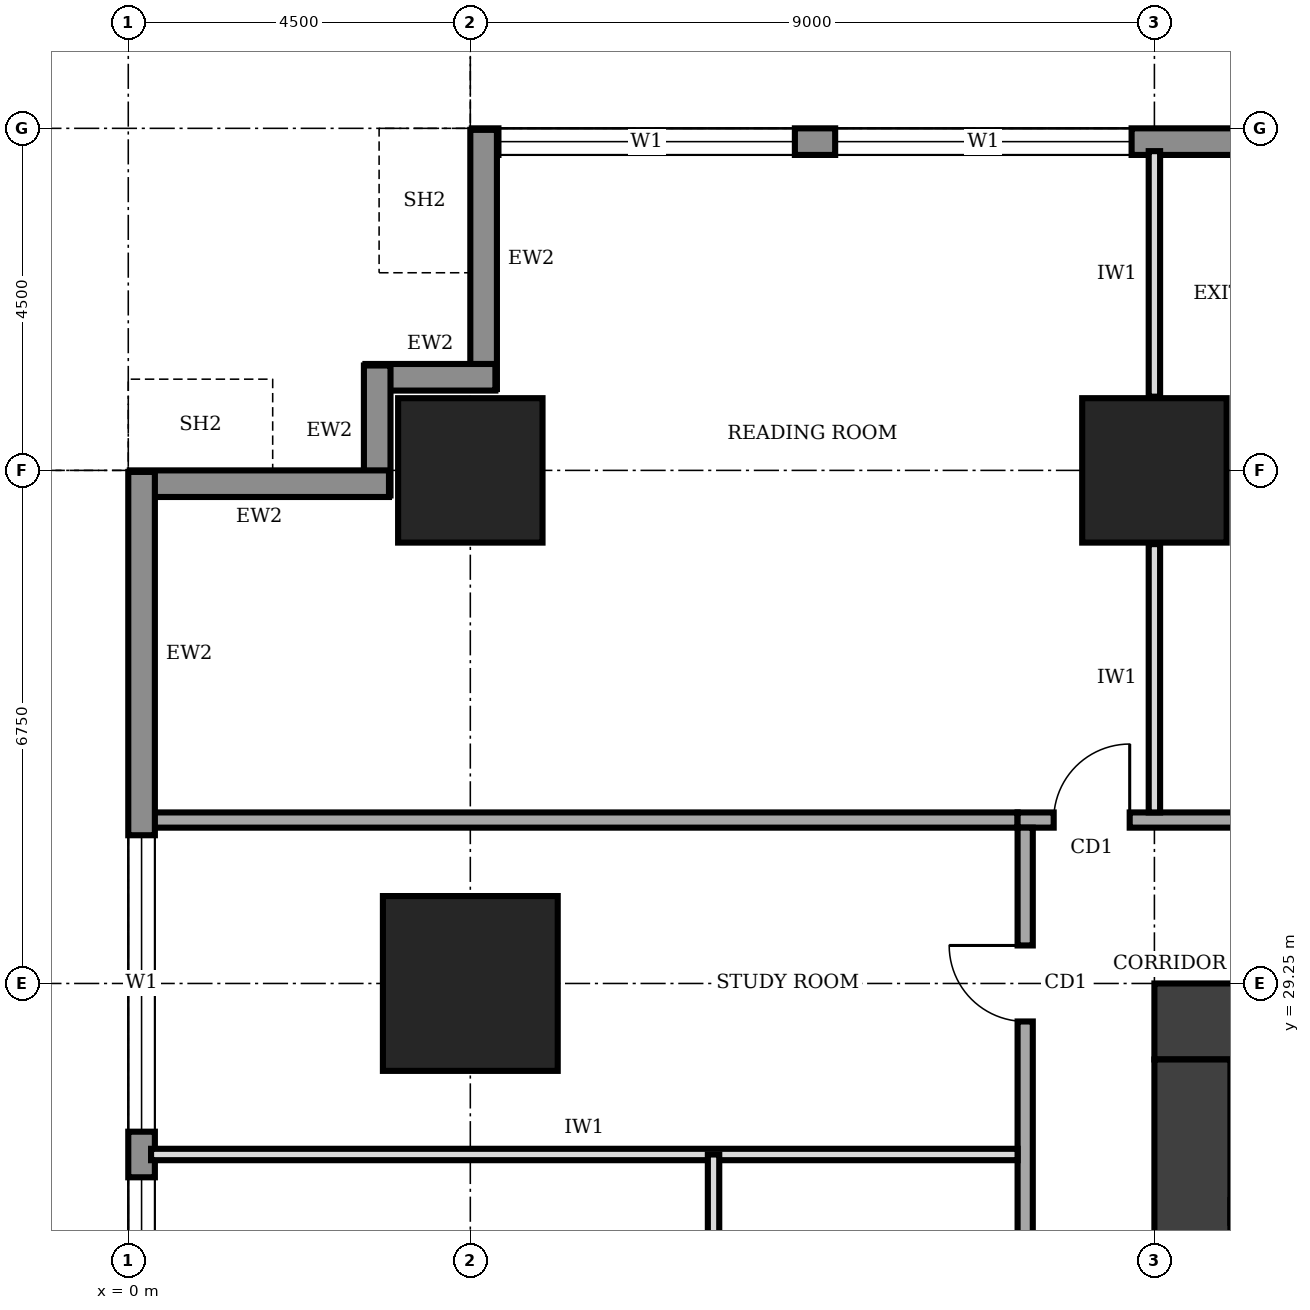
"""IFC4 building model, lengths in metres.
Left out: names, types, materials, properties, quantities, classifications, styles, units other than length and angle.
Written with IfcOpenShell. Run it as: python <this file> out.ifc"""

import sys

from ifc_helpers import new_model, si_unit, direction, frame, frame_2d, origin, origin_2d, place, context, subcontext, project, spatial, rectangle, extrude, element, fill, save


model = new_model("IFC4")
c1 = context("Model", 3, precision=1e-05, world=origin(), true_north=direction((0.0, 1.0)))
c2 = subcontext(c1, "Body", "Model", "MODEL_VIEW")
j1 = project(units=[si_unit("LENGTHUNIT", "METRE"), si_unit("PLANEANGLEUNIT", "RADIAN")], contexts=[c1])
p1 = place(None, origin())
s1 = spatial("IfcSite", under=j1, at=p1, CompositionType="ELEMENT")
p2 = place(p1, origin())
s2 = spatial("IfcBuilding", under=s1, at=p2, CompositionType="ELEMENT")
p3 = place(p2, frame((0.0, 0.0, 129.0)))
s3 = spatial("IfcBuildingStorey", under=s2, at=p3, CompositionType="ELEMENT", Elevation=129.0)
p4 = place(p3, frame((27.0, 28.75, 0.0), z_axis=(0.0, 0.0, 1.0), x_axis=(-1.0, 0.0, 0.0)))
e1 = element("IfcWall", 1, at=p4, inside=s3, PredefinedType="SHEAR", context=c2, shape_type="SweptSolid", body=[
    extrude(rectangle(XDim=13.5, YDim=1.0, at=frame_2d((6.75, 0.0))), origin(), (0.0, 0.0, 1.0), 4.0),
])
p5 = place(p4, frame((4.75, 0.0, 0.0)))
e2 = element("IfcOpeningElement", 2, at=p5, cuts=e1, PredefinedType="OPENING", context=c2, shape_type="SweptSolid", body=[
    extrude(rectangle(XDim=1.8, YDim=2.1, at=frame_2d((0.9, 1.05))), frame((0.0, 0.51, 0.0), z_axis=(0.0, -1.0, 0.0), x_axis=(1.0, 0.0, 0.0)), (0.0, 0.0, 1.0), 1.02),
])
p6 = place(p3, frame((14.0, 28.25, 0.0), z_axis=(0.0, 0.0, 1.0), x_axis=(0.0, -1.0, 0.0)))
e3 = element("IfcWall", 3, at=p6, inside=s3, PredefinedType="SHEAR", context=c2, shape_type="SweptSolid", body=[
    extrude(rectangle(XDim=16.0, YDim=1.0, at=frame_2d((8.0, 0.0))), origin(), (0.0, 0.0, 1.0), 4.0),
])
p7 = place(p3, frame((4.5, 29.25, 0.0), z_axis=(0.0, 0.0, 1.0), x_axis=(1.0, 0.0, 0.0)))
e4 = element("IfcColumn", 4, at=p7, inside=s3, PredefinedType="COLUMN", context=c2, shape_type="SweptSolid", body=[
    extrude(rectangle(XDim=2.3, YDim=2.3, at=origin_2d()), origin(), (0.0, 0.0, 1.0), 4.0),
])
for number, where, z_axis, x_axis in (
    (5, (4.5, 36.0, 0.0), (0.0, 0.0, 1.0), (1.0, 0.0, 0.0)),
    (6, (13.5, 36.0, 0.0), (0.0, 0.0, 1.0), (1.0, 0.0, 0.0)),
):
    element("IfcColumn", number, at=place(p3, frame(where, z_axis=z_axis, x_axis=x_axis)), inside=s3, PredefinedType="COLUMN", context=c2, shape_type="SweptSolid", body=[
        extrude(rectangle(XDim=1.9, YDim=1.9, at=origin_2d()), origin(), (0.0, 0.0, 1.0), 4.0),
    ])
p8 = place(p3, frame((35.98, 40.325, 0.0), z_axis=(0.0, 0.0, 1.0), x_axis=(-1.0, 0.0, 0.0)))
e7 = element("IfcWall", 7, at=p8, inside=s3, PredefinedType="STANDARD", context=c2, shape_type="SweptSolid", body=[
    extrude(rectangle(XDim=31.46, YDim=0.35, at=frame_2d((15.73, 0.0))), origin(), (0.0, 0.0, 1.0), 3.75),
])
p9 = place(p8, frame((27.21, 0.0, 0.9)))
e8 = element("IfcOpeningElement", 8, at=p9, cuts=e7, PredefinedType="OPENING", context=c2, shape_type="SweptSolid", body=[
    extrude(rectangle(XDim=3.9, YDim=2.2, at=frame_2d((1.95, 1.1))), frame((0.0, 0.185, 0.0), z_axis=(0.0, -1.0, 0.0), x_axis=(1.0, 0.0, 0.0)), (0.0, 0.0, 1.0), 0.37),
])
p10 = place(p8, frame((22.78, 0.0, 0.9)))
e9 = element("IfcOpeningElement", 9, at=p10, cuts=e7, PredefinedType="OPENING", context=c2, shape_type="SweptSolid", body=[
    extrude(rectangle(XDim=3.9, YDim=2.2, at=frame_2d((1.95, 1.1))), frame((0.0, 0.185, 0.0), z_axis=(0.0, -1.0, 0.0), x_axis=(1.0, 0.0, 0.0)), (0.0, 0.0, 1.0), 0.37),
])
p11 = place(p8, frame((4.78, 0.0, 0.9)))
e10 = element("IfcOpeningElement", 10, at=p11, cuts=e7, PredefinedType="OPENING", context=c2, shape_type="SweptSolid", body=[
    extrude(rectangle(XDim=3.9, YDim=2.2, at=frame_2d((1.95, 1.1))), frame((0.0, 0.185, 0.0), z_axis=(0.0, -1.0, 0.0), x_axis=(1.0, 0.0, 0.0)), (0.0, 0.0, 1.0), 0.37),
])
p12 = place(p3, frame((4.675, 40.48, 0.0), z_axis=(0.0, 0.0, 1.0), x_axis=(0.0, -1.0, 0.0)))
e11 = element("IfcWall", 11, at=p12, inside=s3, PredefinedType="STANDARD", context=c2, shape_type="SweptSolid", body=[
    extrude(rectangle(XDim=3.41, YDim=0.35, at=frame_2d((1.705, 0.0))), origin(), (0.0, 0.0, 1.0), 2.85),
])
for number, where, z_axis, x_axis in (
    (12, (4.83, 37.225, 0.0), (0.0, 0.0, 1.0), (-1.0, 0.0, 0.0)),
    (13, (3.275, 37.38, 0.0), (0.0, 0.0, 1.0), (0.0, -1.0, 0.0)),
):
    element("IfcWall", number, at=place(p3, frame(where, z_axis=z_axis, x_axis=x_axis)), inside=s3, PredefinedType="STANDARD", context=c2, shape_type="SweptSolid", body=[
        extrude(rectangle(XDim=1.71, YDim=0.35, at=frame_2d((0.855, 0.0))), origin(), (0.0, 0.0, 1.0), 3.75),
    ])
p13 = place(p3, frame((3.43, 35.825, 0.0), z_axis=(0.0, 0.0, 1.0), x_axis=(-1.0, 0.0, 0.0)))
e14 = element("IfcWall", 14, at=p13, inside=s3, PredefinedType="STANDARD", context=c2, shape_type="SweptSolid", body=[
    extrude(rectangle(XDim=3.41, YDim=0.35, at=frame_2d((1.705, 0.0))), origin(), (0.0, 0.0, 1.0), 2.85),
])
p14 = place(p3, frame((0.175, 35.98, 0.0), z_axis=(0.0, 0.0, 1.0), x_axis=(0.0, -1.0, 0.0)))
e15 = element("IfcWall", 15, at=p14, inside=s3, PredefinedType="STANDARD", context=c2, shape_type="SweptSolid", body=[
    extrude(rectangle(XDim=31.46, YDim=0.35, at=frame_2d((15.73, 0.0))), origin(), (0.0, 0.0, 1.0), 3.75),
])
p15 = place(p14, frame((27.21, 0.0, 0.9)))
e16 = element("IfcOpeningElement", 16, at=p15, cuts=e15, PredefinedType="OPENING", context=c2, shape_type="SweptSolid", body=[
    extrude(rectangle(XDim=3.9, YDim=2.2, at=frame_2d((1.95, 1.1))), frame((0.0, 0.185, 0.0), z_axis=(0.0, -1.0, 0.0), x_axis=(1.0, 0.0, 0.0)), (0.0, 0.0, 1.0), 0.37),
])
p16 = place(p14, frame((22.78, 0.0, 0.9)))
e17 = element("IfcOpeningElement", 17, at=p16, cuts=e15, PredefinedType="OPENING", context=c2, shape_type="SweptSolid", body=[
    extrude(rectangle(XDim=3.9, YDim=2.2, at=frame_2d((1.95, 1.1))), frame((0.0, 0.185, 0.0), z_axis=(0.0, -1.0, 0.0), x_axis=(1.0, 0.0, 0.0)), (0.0, 0.0, 1.0), 0.37),
])
p17 = place(p14, frame((18.28, 0.0, 0.9)))
e18 = element("IfcOpeningElement", 18, at=p17, cuts=e15, PredefinedType="OPENING", context=c2, shape_type="SweptSolid", body=[
    extrude(rectangle(XDim=3.9, YDim=2.2, at=frame_2d((1.95, 1.1))), frame((0.0, 0.185, 0.0), z_axis=(0.0, -1.0, 0.0), x_axis=(1.0, 0.0, 0.0)), (0.0, 0.0, 1.0), 0.37),
])
p18 = place(p14, frame((13.78, 0.0, 0.9)))
e19 = element("IfcOpeningElement", 19, at=p18, cuts=e15, PredefinedType="OPENING", context=c2, shape_type="SweptSolid", body=[
    extrude(rectangle(XDim=3.9, YDim=2.2, at=frame_2d((1.95, 1.1))), frame((0.0, 0.185, 0.0), z_axis=(0.0, -1.0, 0.0), x_axis=(1.0, 0.0, 0.0)), (0.0, 0.0, 1.0), 0.37),
])
p19 = place(p14, frame((9.28, 0.0, 0.9)))
e20 = element("IfcOpeningElement", 20, at=p19, cuts=e15, PredefinedType="OPENING", context=c2, shape_type="SweptSolid", body=[
    extrude(rectangle(XDim=3.9, YDim=2.2, at=frame_2d((1.95, 1.1))), frame((0.0, 0.185, 0.0), z_axis=(0.0, -1.0, 0.0), x_axis=(1.0, 0.0, 0.0)), (0.0, 0.0, 1.0), 0.37),
])
p20 = place(p14, frame((4.78, 0.0, 0.9)))
e21 = element("IfcOpeningElement", 21, at=p20, cuts=e15, PredefinedType="OPENING", context=c2, shape_type="SweptSolid", body=[
    extrude(rectangle(XDim=3.9, YDim=2.2, at=frame_2d((1.95, 1.1))), frame((0.0, 0.185, 0.0), z_axis=(0.0, -1.0, 0.0), x_axis=(1.0, 0.0, 0.0)), (0.0, 0.0, 1.0), 0.37),
])
p21 = place(p3, frame((28.6, 31.4, 0.0), z_axis=(0.0, 0.0, 1.0), x_axis=(-1.0, 0.0, 0.0)))
e22 = element("IfcWall", 22, at=p21, inside=s3, PredefinedType="SOLIDWALL", context=c2, shape_type="SweptSolid", body=[
    extrude(rectangle(XDim=16.9, YDim=0.2, at=frame_2d((8.45, 0.0))), origin(), (0.0, 0.0, 1.0), 3.75),
])
p22 = place(p21, frame((15.425, 0.0, 0.0)))
e23 = element("IfcOpeningElement", 23, at=p22, cuts=e22, PredefinedType="OPENING", context=c2, shape_type="SweptSolid", body=[
    extrude(rectangle(XDim=1.0, YDim=2.1, at=frame_2d((0.5, 1.05))), frame((0.0, 0.11, 0.0), z_axis=(0.0, -1.0, 0.0), x_axis=(1.0, 0.0, 0.0)), (0.0, 0.0, 1.0), 0.22),
])
p23 = place(p21, frame((12.35, 0.0, 0.0)))
e24 = element("IfcOpeningElement", 24, at=p23, cuts=e22, PredefinedType="OPENING", context=c2, shape_type="SweptSolid", body=[
    extrude(rectangle(XDim=1.0, YDim=2.1, at=frame_2d((0.5, 1.05))), frame((0.0, 0.11, 0.0), z_axis=(0.0, -1.0, 0.0), x_axis=(1.0, 0.0, 0.0)), (0.0, 0.0, 1.0), 0.22),
])
p24 = place(p21, frame((5.6, 0.0, 0.0)))
e25 = element("IfcOpeningElement", 25, at=p24, cuts=e22, PredefinedType="OPENING", context=c2, shape_type="SweptSolid", body=[
    extrude(rectangle(XDim=1.0, YDim=2.1, at=frame_2d((0.5, 1.05))), frame((0.0, 0.11, 0.0), z_axis=(0.0, -1.0, 0.0), x_axis=(1.0, 0.0, 0.0)), (0.0, 0.0, 1.0), 0.22),
])
p25 = place(p21, frame((0.275, 0.0, 0.0)))
e26 = element("IfcOpeningElement", 26, at=p25, cuts=e22, PredefinedType="OPENING", context=c2, shape_type="SweptSolid", body=[
    extrude(rectangle(XDim=1.0, YDim=2.1, at=frame_2d((0.5, 1.05))), frame((0.0, 0.11, 0.0), z_axis=(0.0, -1.0, 0.0), x_axis=(1.0, 0.0, 0.0)), (0.0, 0.0, 1.0), 0.22),
])
p26 = place(p3, frame((11.8, 31.3, 0.0), z_axis=(0.0, 0.0, 1.0), x_axis=(0.0, -1.0, 0.0)))
e27 = element("IfcWall", 27, at=p26, inside=s3, PredefinedType="SOLIDWALL", context=c2, shape_type="SweptSolid", body=[
    extrude(rectangle(XDim=23.8, YDim=0.2, at=frame_2d((11.9, 0.0))), origin(), (0.0, 0.0, 1.0), 3.75),
])
p27 = place(p26, frame((20.3, 0.0, 0.0)))
e28 = element("IfcOpeningElement", 28, at=p27, cuts=e27, PredefinedType="OPENING", context=c2, shape_type="SweptSolid", body=[
    extrude(rectangle(XDim=1.0, YDim=2.1, at=frame_2d((0.5, 1.05))), frame((0.0, 0.11, 0.0), z_axis=(0.0, -1.0, 0.0), x_axis=(1.0, 0.0, 0.0)), (0.0, 0.0, 1.0), 0.22),
])
p28 = place(p26, frame((16.2, 0.0, 0.0)))
e29 = element("IfcOpeningElement", 29, at=p28, cuts=e27, PredefinedType="OPENING", context=c2, shape_type="SweptSolid", body=[
    extrude(rectangle(XDim=1.0, YDim=2.1, at=frame_2d((0.5, 1.05))), frame((0.0, 0.11, 0.0), z_axis=(0.0, -1.0, 0.0), x_axis=(1.0, 0.0, 0.0)), (0.0, 0.0, 1.0), 0.22),
])
p29 = place(p26, frame((13.2, 0.0, 0.0)))
e30 = element("IfcOpeningElement", 30, at=p29, cuts=e27, PredefinedType="OPENING", context=c2, shape_type="SweptSolid", body=[
    extrude(rectangle(XDim=0.9, YDim=2.1, at=frame_2d((0.45, 1.05))), frame((0.0, 0.11, 0.0), z_axis=(0.0, -1.0, 0.0), x_axis=(1.0, 0.0, 0.0)), (0.0, 0.0, 1.0), 0.22),
])
p30 = place(p26, frame((10.15, 0.0, 0.0)))
e31 = element("IfcOpeningElement", 31, at=p30, cuts=e27, PredefinedType="OPENING", context=c2, shape_type="SweptSolid", body=[
    extrude(rectangle(XDim=0.9, YDim=2.1, at=frame_2d((0.45, 1.05))), frame((0.0, 0.11, 0.0), z_axis=(0.0, -1.0, 0.0), x_axis=(1.0, 0.0, 0.0)), (0.0, 0.0, 1.0), 0.22),
])
p31 = place(p26, frame((5.45, 0.0, 0.0)))
e32 = element("IfcOpeningElement", 32, at=p31, cuts=e27, PredefinedType="OPENING", context=c2, shape_type="SweptSolid", body=[
    extrude(rectangle(XDim=0.9, YDim=2.1, at=frame_2d((0.45, 1.05))), frame((0.0, 0.11, 0.0), z_axis=(0.0, -1.0, 0.0), x_axis=(1.0, 0.0, 0.0)), (0.0, 0.0, 1.0), 0.22),
])
p32 = place(p26, frame((8.0, 0.0, 0.0)))
e33 = element("IfcOpeningElement", 33, at=p32, cuts=e27, PredefinedType="OPENING", context=c2, shape_type="SweptSolid", body=[
    extrude(rectangle(XDim=1.0, YDim=2.1, at=frame_2d((0.5, 1.05))), frame((0.0, 0.11, 0.0), z_axis=(0.0, -1.0, 0.0), x_axis=(1.0, 0.0, 0.0)), (0.0, 0.0, 1.0), 0.22),
])
p33 = place(p26, frame((1.55, 0.0, 0.0)))
e34 = element("IfcOpeningElement", 34, at=p33, cuts=e27, PredefinedType="OPENING", context=c2, shape_type="SweptSolid", body=[
    extrude(rectangle(XDim=1.0, YDim=2.1, at=frame_2d((0.5, 1.05))), frame((0.0, 0.11, 0.0), z_axis=(0.0, -1.0, 0.0), x_axis=(1.0, 0.0, 0.0)), (0.0, 0.0, 1.0), 0.22),
])
p34 = place(p3, frame((0.3, 31.4, 0.0), z_axis=(0.0, 0.0, 1.0), x_axis=(1.0, 0.0, 0.0)))
e35 = element("IfcWall", 35, at=p34, inside=s3, PredefinedType="SOLIDWALL", context=c2, shape_type="SweptSolid", body=[
    extrude(rectangle(XDim=11.4, YDim=0.2, at=frame_2d((5.7, 0.0))), origin(), (0.0, 0.0, 1.0), 3.75),
])
p35 = place(p3, frame((13.5, 31.5, 0.0), z_axis=(0.0, 0.0, 1.0), x_axis=(0.0, 1.0, 0.0)))
e36 = element("IfcWall", 36, at=p35, inside=s3, PredefinedType="PARTITIONING", context=c2, shape_type="SweptSolid", body=[
    extrude(rectangle(XDim=3.53, YDim=0.15, at=frame_2d((1.765, 0.0))), origin(), (0.0, 0.0, 1.0), 2.85),
])
p36 = place(p3, frame((13.5, 36.97, 0.0), z_axis=(0.0, 0.0, 1.0), x_axis=(0.0, 1.0, 0.0)))
e37 = element("IfcWall", 37, at=p36, inside=s3, PredefinedType="PARTITIONING", context=c2, shape_type="SweptSolid", body=[
    extrude(rectangle(XDim=3.23, YDim=0.15, at=frame_2d((1.615, 0.0))), origin(), (0.0, 0.0, 1.0), 2.85),
])
p37 = place(p3, frame((0.3, 27.0, 0.0), z_axis=(0.0, 0.0, 1.0), x_axis=(1.0, 0.0, 0.0)))
e38 = element("IfcWall", 38, at=p37, inside=s3, PredefinedType="PARTITIONING", context=c2, shape_type="SweptSolid", body=[
    extrude(rectangle(XDim=11.4, YDim=0.15, at=frame_2d((5.7, 0.0))), origin(), (0.0, 0.0, 1.0), 3.75),
])
p38 = place(p3, frame((7.7, 23.8, 0.0), z_axis=(0.0, 0.0, 1.0), x_axis=(0.0, 1.0, 0.0)))
e39 = element("IfcWall", 39, at=p38, inside=s3, PredefinedType="PARTITIONING", context=c2, shape_type="SweptSolid", body=[
    extrude(rectangle(XDim=3.2, YDim=0.15, at=frame_2d((1.6, 0.0))), origin(), (0.0, 0.0, 1.0), 3.75),
])
p39 = place(p9, origin())
e40 = element("IfcWindow", 40, at=p39, inside=s3, PartitioningType="SINGLE_PANEL", PredefinedType="WINDOW", context=c2, shape_type="SweptSolid", body=[
    extrude(rectangle(XDim=3.9, YDim=2.2, at=frame_2d((1.95, 1.1))), frame((0.0, 0.03, 0.0), z_axis=(0.0, -1.0, 0.0), x_axis=(1.0, 0.0, 0.0)), (0.0, 0.0, 1.0), 0.06),
])
fill(e8, e40)
p40 = place(p10, origin())
e41 = element("IfcWindow", 41, at=p40, inside=s3, PartitioningType="SINGLE_PANEL", PredefinedType="WINDOW", context=c2, shape_type="SweptSolid", body=[
    extrude(rectangle(XDim=3.9, YDim=2.2, at=frame_2d((1.95, 1.1))), frame((0.0, 0.03, 0.0), z_axis=(0.0, -1.0, 0.0), x_axis=(1.0, 0.0, 0.0)), (0.0, 0.0, 1.0), 0.06),
])
fill(e9, e41)
p41 = place(p19, origin())
e42 = element("IfcWindow", 42, at=p41, inside=s3, PartitioningType="SINGLE_PANEL", PredefinedType="WINDOW", context=c2, shape_type="SweptSolid", body=[
    extrude(rectangle(XDim=3.9, YDim=2.2, at=frame_2d((1.95, 1.1))), frame((0.0, 0.03, 0.0), z_axis=(0.0, -1.0, 0.0), x_axis=(1.0, 0.0, 0.0)), (0.0, 0.0, 1.0), 0.06),
])
fill(e20, e42)
p42 = place(p20, origin())
e43 = element("IfcWindow", 43, at=p42, inside=s3, PartitioningType="SINGLE_PANEL", PredefinedType="WINDOW", context=c2, shape_type="SweptSolid", body=[
    extrude(rectangle(XDim=3.9, YDim=2.2, at=frame_2d((1.95, 1.1))), frame((0.0, 0.03, 0.0), z_axis=(0.0, -1.0, 0.0), x_axis=(1.0, 0.0, 0.0)), (0.0, 0.0, 1.0), 0.06),
])
fill(e21, e43)
p43 = place(p22, frame((1.0, 0.0, 0.0), z_axis=(0.0, 0.0, 1.0), x_axis=(-1.0, 0.0, 0.0)))
e44 = element("IfcDoor", 44, at=p43, inside=s3, OperationType="SINGLE_SWING_RIGHT", PredefinedType="DOOR", context=c2, shape_type="SweptSolid", body=[
    extrude(rectangle(XDim=1.0, YDim=2.1, at=frame_2d((0.5, 1.05))), frame((0.0, 0.025, 0.0), z_axis=(0.0, -1.0, 0.0), x_axis=(1.0, 0.0, 0.0)), (0.0, 0.0, 1.0), 0.05),
])
fill(e23, e44)
p44 = place(p33, frame((1.0, 0.0, 0.0), z_axis=(0.0, 0.0, 1.0), x_axis=(-1.0, 0.0, 0.0)))
e45 = element("IfcDoor", 45, at=p44, inside=s3, OperationType="SINGLE_SWING_RIGHT", PredefinedType="DOOR", context=c2, shape_type="SweptSolid", body=[
    extrude(rectangle(XDim=1.0, YDim=2.1, at=frame_2d((0.5, 1.05))), frame((0.0, 0.025, 0.0), z_axis=(0.0, -1.0, 0.0), x_axis=(1.0, 0.0, 0.0)), (0.0, 0.0, 1.0), 0.05),
])
fill(e34, e45)
save(model, sys.argv[1])
